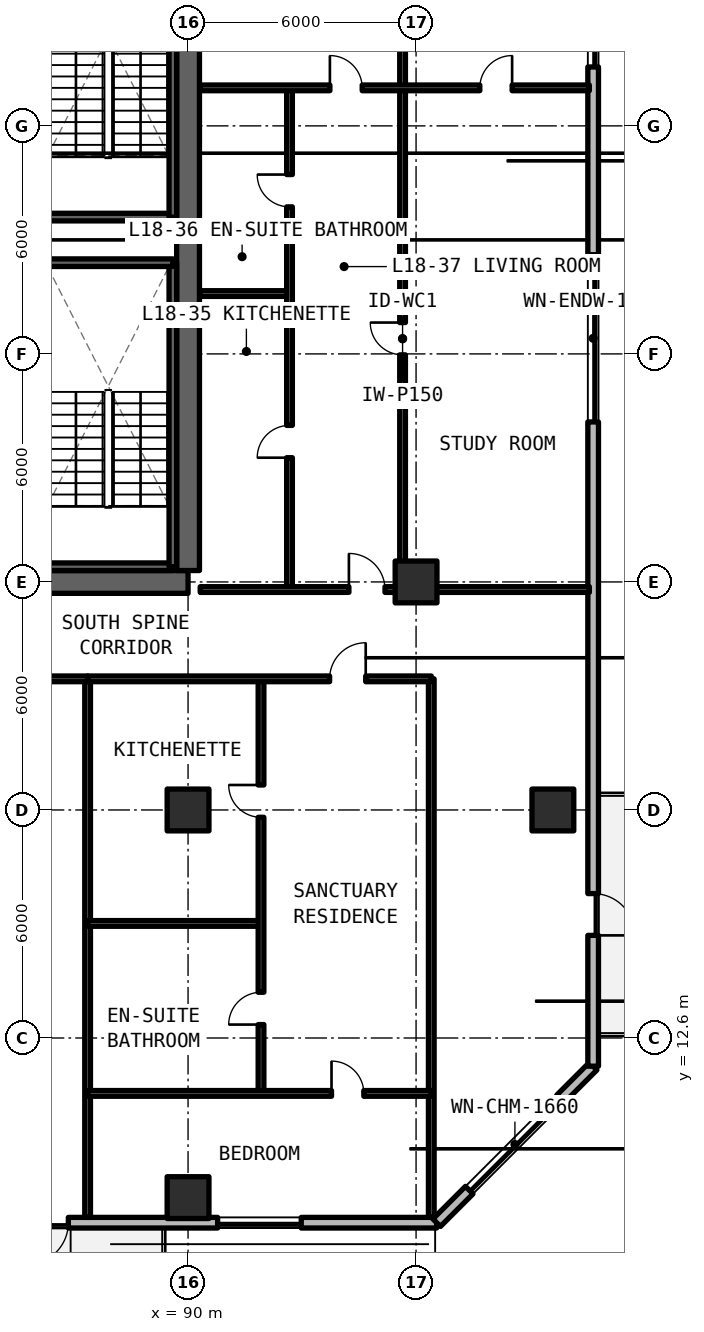
"""IFC4 building model, lengths in metres.
Left out: names, types, materials, properties, quantities, classifications, styles, units other than length and angle.
Written with IfcOpenShell. Run it as: python <this file> out.ifc"""

import sys

from ifc_helpers import new_model, si_unit, direction, frame, frame_2d, origin, origin_2d, place, context, subcontext, project, spatial, rectangle, extrude, element, fill, save


model = new_model("IFC4")
c1 = context("Model", 3, precision=1e-05, world=origin(), true_north=direction((0.0, 1.0)))
c2 = subcontext(c1, "Body", "Model", "MODEL_VIEW")
j1 = project(units=[si_unit("LENGTHUNIT", "METRE"), si_unit("PLANEANGLEUNIT", "RADIAN")], contexts=[c1])
p1 = place(None, origin())
s1 = spatial("IfcSite", under=j1, at=p1, CompositionType="ELEMENT")
p2 = place(p1, origin())
s2 = spatial("IfcBuilding", under=s1, at=p2, CompositionType="ELEMENT")
p3 = place(p2, frame((0.0, 0.0, 66.0)))
s3 = spatial("IfcBuildingStorey", under=s2, at=p3, CompositionType="ELEMENT", Elevation=66.0)
p4 = place(p3, frame((78.0, 24.6, 0.0), z_axis=(0.0, 0.0, 1.0), x_axis=(1.0, 0.0, 0.0)))
e1 = element("IfcWall", 1, at=p4, inside=s3, PredefinedType="SHEAR", context=c2, shape_type="SweptSolid", body=[
    extrude(rectangle(XDim=12.0, YDim=0.6, at=frame_2d((6.0, 0.0))), origin(), (0.0, 0.0, 1.0), 3.63),
])
p5 = place(p3, frame((90.0, 24.9, 0.0), z_axis=(0.0, 0.0, 1.0), x_axis=(0.0, 1.0, 0.0)))
e2 = element("IfcWall", 2, at=p5, inside=s3, PredefinedType="SHEAR", context=c2, shape_type="SweptSolid", body=[
    extrude(rectangle(XDim=17.4, YDim=0.6, at=frame_2d((8.7, 0.0))), origin(), (0.0, 0.0, 1.0), 3.63),
])
for number, where, z_axis, x_axis in (
    (3, (96.0, 24.6, 0.0), (0.0, 0.0, 1.0), (1.0, 0.0, 0.0)),
    (4, (90.0, 18.6, 0.0), (0.0, 0.0, 1.0), (1.0, 0.0, 0.0)),
    (5, (99.6, 18.6, 0.0), (0.0, 0.0, 1.0), (1.0, 0.0, 0.0)),
    (6, (90.0, 8.4, 0.0), (0.0, 0.0, 1.0), (1.0, 0.0, 0.0)),
):
    element("IfcColumn", number, at=place(p3, frame(where, z_axis=z_axis, x_axis=x_axis)), inside=s3, PredefinedType="COLUMN", context=c2, shape_type="SweptSolid", body=[
        extrude(rectangle(XDim=1.1, YDim=1.1, at=origin_2d()), origin(), (0.0, 0.0, 1.0), 3.63),
    ])
p6 = place(p3, frame((52.14, 7.74, 0.0), z_axis=(0.0, 0.0, 1.0), x_axis=(1.0, 0.0, 0.0)))
e7 = element("IfcWall", 7, at=p6, inside=s3, PredefinedType="SOLIDWALL", context=c2, shape_type="SweptSolid", body=[
    extrude(rectangle(XDim=44.402, YDim=0.28, at=frame_2d((22.201, 0.0))), origin(), (0.0, 0.0, 1.0), 3.41),
])
p7 = place(p6, frame((9.66, 0.0, 0.0)))
e8 = element("IfcOpeningElement", 8, at=p7, cuts=e7, PredefinedType="OPENING", context=c2, shape_type="SweptSolid", body=[
    extrude(rectangle(XDim=1.1, YDim=2.15, at=frame_2d((0.55, 1.075))), frame((0.0, 0.15, 0.0), z_axis=(0.0, -1.0, 0.0), x_axis=(1.0, 0.0, 0.0)), (0.0, 0.0, 1.0), 0.3),
])
p8 = place(p6, frame((21.76, 0.0, 0.0)))
e9 = element("IfcOpeningElement", 9, at=p8, cuts=e7, PredefinedType="OPENING", context=c2, shape_type="SweptSolid", body=[
    extrude(rectangle(XDim=1.1, YDim=2.15, at=frame_2d((0.55, 1.075))), frame((0.0, 0.15, 0.0), z_axis=(0.0, -1.0, 0.0), x_axis=(1.0, 0.0, 0.0)), (0.0, 0.0, 1.0), 0.3),
])
p9 = place(p6, frame((33.61, 0.0, 0.0)))
e10 = element("IfcOpeningElement", 10, at=p9, cuts=e7, PredefinedType="OPENING", context=c2, shape_type="SweptSolid", body=[
    extrude(rectangle(XDim=1.1, YDim=2.15, at=frame_2d((0.55, 1.075))), frame((0.0, 0.15, 0.0), z_axis=(0.0, -1.0, 0.0), x_axis=(1.0, 0.0, 0.0)), (0.0, 0.0, 1.0), 0.3),
])
p10 = place(p6, frame((2.622, 0.0, 0.78)))
e11 = element("IfcOpeningElement", 11, at=p10, cuts=e7, PredefinedType="OPENING", context=c2, shape_type="SweptSolid", body=[
    extrude(rectangle(XDim=2.2, YDim=1.66, at=frame_2d((1.1, 0.83))), frame((0.0, 0.15, 0.0), z_axis=(0.0, -1.0, 0.0), x_axis=(1.0, 0.0, 0.0)), (0.0, 0.0, 1.0), 0.3),
])
p11 = place(p6, frame((38.638, 0.0, 0.78)))
e12 = element("IfcOpeningElement", 12, at=p11, cuts=e7, PredefinedType="OPENING", context=c2, shape_type="SweptSolid", body=[
    extrude(rectangle(XDim=2.2, YDim=1.66, at=frame_2d((1.1, 0.83))), frame((0.0, 0.15, 0.0), z_axis=(0.0, -1.0, 0.0), x_axis=(1.0, 0.0, 0.0)), (0.0, 0.0, 1.0), 0.3),
])
p12 = place(p3, frame((96.542, 7.74, 0.0), z_axis=(0.0, 0.0, 1.0), x_axis=(0.707106781187, 0.707106781187, 0.0)))
e13 = element("IfcWall", 13, at=p12, inside=s3, PredefinedType="SOLIDWALL", context=c2, shape_type="SweptSolid", body=[
    extrude(rectangle(XDim=5.824, YDim=0.28, at=frame_2d((2.912, 0.0))), origin(), (0.0, 0.0, 1.0), 3.41),
])
p13 = place(p12, frame((1.212, 0.0, 0.78)))
e14 = element("IfcOpeningElement", 14, at=p13, cuts=e13, PredefinedType="OPENING", context=c2, shape_type="SweptSolid", body=[
    extrude(rectangle(XDim=3.4, YDim=1.66, at=frame_2d((1.7, 0.83))), frame((0.0, 0.15, 0.0), z_axis=(0.0, -1.0, 0.0), x_axis=(1.0, 0.0, 0.0)), (0.0, 0.0, 1.0), 0.3),
])
p14 = place(p3, frame((100.66, 11.858, 0.0), z_axis=(0.0, 0.0, 1.0), x_axis=(0.0, 1.0, 0.0)))
e15 = element("IfcWall", 15, at=p14, inside=s3, PredefinedType="SOLIDWALL", context=c2, shape_type="SweptSolid", body=[
    extrude(rectangle(XDim=43.484, YDim=0.28, at=frame_2d((21.742, 0.0))), origin(), (0.0, 0.0, 1.0), 3.41),
])
p15 = place(p14, frame((3.442, 0.0, 0.0)))
e16 = element("IfcOpeningElement", 16, at=p15, cuts=e15, PredefinedType="OPENING", context=c2, shape_type="SweptSolid", body=[
    extrude(rectangle(XDim=1.1, YDim=2.15, at=frame_2d((0.55, 1.075))), frame((0.0, 0.15, 0.0), z_axis=(0.0, -1.0, 0.0), x_axis=(1.0, 0.0, 0.0)), (0.0, 0.0, 1.0), 0.3),
])
p16 = place(p14, frame((16.952, 0.0, 0.78)))
e17 = element("IfcOpeningElement", 17, at=p16, cuts=e15, PredefinedType="OPENING", context=c2, shape_type="SweptSolid", body=[
    extrude(rectangle(XDim=4.4, YDim=1.66, at=frame_2d((2.2, 0.83))), frame((0.0, 0.15, 0.0), z_axis=(0.0, -1.0, 0.0), x_axis=(1.0, 0.0, 0.0)), (0.0, 0.0, 1.0), 0.3),
])
p17 = place(p14, frame((26.292, 0.0, 0.78)))
e18 = element("IfcOpeningElement", 18, at=p17, cuts=e15, PredefinedType="OPENING", context=c2, shape_type="SweptSolid", body=[
    extrude(rectangle(XDim=4.4, YDim=1.66, at=frame_2d((2.2, 0.83))), frame((0.0, 0.15, 0.0), z_axis=(0.0, -1.0, 0.0), x_axis=(1.0, 0.0, 0.0)), (0.0, 0.0, 1.0), 0.3),
])
p18 = place(p3, frame((95.645, 24.4, 0.0), z_axis=(0.0, 0.0, 1.0), x_axis=(0.0, 1.0, 0.0)))
e19 = element("IfcWall", 19, at=p18, inside=s3, PredefinedType="PARTITIONING", context=c2, shape_type="SweptSolid", body=[
    extrude(rectangle(XDim=13.2, YDim=0.15, at=frame_2d((6.6, 0.0))), origin(), (0.0, 0.0, 1.0), 2.63),
])
p19 = place(p18, frame((6.175, 0.0, 0.0)))
e20 = element("IfcOpeningElement", 20, at=p19, cuts=e19, PredefinedType="OPENING", context=c2, shape_type="SweptSolid", body=[
    extrude(rectangle(XDim=0.85, YDim=2.1, at=frame_2d((0.425, 1.05))), frame((0.0, 0.085, 0.0), z_axis=(0.0, -1.0, 0.0), x_axis=(1.0, 0.0, 0.0)), (0.0, 0.0, 1.0), 0.17),
])
p20 = place(p3, frame((90.32, 32.188, 0.0), z_axis=(0.0, 0.0, 1.0), x_axis=(1.0, 0.0, 0.0)))
e21 = element("IfcWall", 21, at=p20, inside=s3, PredefinedType="PARTITIONING", context=c2, shape_type="SweptSolid", body=[
    extrude(rectangle(XDim=2.35, YDim=0.15, at=frame_2d((1.175, 0.0))), origin(), (0.0, 0.0, 1.0), 2.63),
])
p21 = place(p3, frame((92.67, 24.4, 0.0), z_axis=(0.0, 0.0, 1.0), x_axis=(0.0, 1.0, 0.0)))
e22 = element("IfcWall", 22, at=p21, inside=s3, PredefinedType="PARTITIONING", context=c2, shape_type="SweptSolid", body=[
    extrude(rectangle(XDim=13.2, YDim=0.15, at=frame_2d((6.6, 0.0))), origin(), (0.0, 0.0, 1.0), 2.63),
])
p22 = place(p21, frame((3.469, 0.0, 0.0)))
e23 = element("IfcOpeningElement", 23, at=p22, cuts=e22, PredefinedType="OPENING", context=c2, shape_type="SweptSolid", body=[
    extrude(rectangle(XDim=0.85, YDim=2.1, at=frame_2d((0.425, 1.05))), frame((0.0, 0.085, 0.0), z_axis=(0.0, -1.0, 0.0), x_axis=(1.0, 0.0, 0.0)), (0.0, 0.0, 1.0), 0.17),
])
p23 = place(p21, frame((10.069, 0.0, 0.0)))
e24 = element("IfcOpeningElement", 24, at=p23, cuts=e22, PredefinedType="OPENING", context=c2, shape_type="SweptSolid", body=[
    extrude(rectangle(XDim=0.85, YDim=2.1, at=frame_2d((0.425, 1.05))), frame((0.0, 0.085, 0.0), z_axis=(0.0, -1.0, 0.0), x_axis=(1.0, 0.0, 0.0)), (0.0, 0.0, 1.0), 0.17),
])
p24 = place(p3, frame((95.645, 37.6, 0.0), z_axis=(0.0, 0.0, 1.0), x_axis=(0.0, 1.0, 0.0)))
e25 = element("IfcWall", 25, at=p24, inside=s3, PredefinedType="PARTITIONING", context=c2, shape_type="SweptSolid", body=[
    extrude(rectangle(XDim=5.2, YDim=0.15, at=frame_2d((2.6, 0.0))), origin(), (0.0, 0.0, 1.0), 2.63),
])
p25 = place(p3, frame((90.32, 37.6, 0.0), z_axis=(0.0, 0.0, 1.0), x_axis=(1.0, 0.0, 0.0)))
e26 = element("IfcWall", 26, at=p25, inside=s3, PredefinedType="PARTITIONING", context=c2, shape_type="SweptSolid", body=[
    extrude(rectangle(XDim=10.24, YDim=0.15, at=frame_2d((5.12, 0.0))), origin(), (0.0, 0.0, 1.0), 2.63),
])
p26 = place(p25, frame((3.412, 0.0, 0.0)))
e27 = element("IfcOpeningElement", 27, at=p26, cuts=e26, PredefinedType="OPENING", context=c2, shape_type="SweptSolid", body=[
    extrude(rectangle(XDim=0.85, YDim=2.1, at=frame_2d((0.425, 1.05))), frame((0.0, 0.085, 0.0), z_axis=(0.0, -1.0, 0.0), x_axis=(1.0, 0.0, 0.0)), (0.0, 0.0, 1.0), 0.17),
])
p27 = place(p25, frame((7.357, 0.0, 0.0)))
e28 = element("IfcOpeningElement", 28, at=p27, cuts=e26, PredefinedType="OPENING", context=c2, shape_type="SweptSolid", body=[
    extrude(rectangle(XDim=0.85, YDim=2.1, at=frame_2d((0.425, 1.05))), frame((0.0, 0.085, 0.0), z_axis=(0.0, -1.0, 0.0), x_axis=(1.0, 0.0, 0.0)), (0.0, 0.0, 1.0), 0.17),
])
p28 = place(p3, frame((90.32, 24.4, 0.0), z_axis=(0.0, 0.0, 1.0), x_axis=(1.0, 0.0, 0.0)))
e29 = element("IfcWall", 29, at=p28, inside=s3, PredefinedType="SOLIDWALL", context=c2, shape_type="SweptSolid", body=[
    extrude(rectangle(XDim=10.24, YDim=0.15, at=frame_2d((5.12, 0.0))), origin(), (0.0, 0.0, 1.0), 2.625),
])
p29 = place(p28, frame((3.913, 0.0, 0.0)))
e30 = element("IfcOpeningElement", 30, at=p29, cuts=e29, PredefinedType="OPENING", context=c2, shape_type="SweptSolid", body=[
    extrude(rectangle(XDim=0.95, YDim=2.15, at=frame_2d((0.475, 1.075))), frame((0.0, 0.085, 0.0), z_axis=(0.0, -1.0, 0.0), x_axis=(1.0, 0.0, 0.0)), (0.0, 0.0, 1.0), 0.17),
])
for number, where, z_axis, x_axis in (
    (31, (96.4, 7.88, 0.0), (0.0, 0.0, 1.0), (0.0, 1.0, 0.0)),
    (32, (87.357, 7.88, 0.0), (0.0, 0.0, 1.0), (0.0, 1.0, 0.0)),
):
    element("IfcWall", number, at=place(p3, frame(where, z_axis=z_axis, x_axis=x_axis)), inside=s3, PredefinedType="SOLIDWALL", context=c2, shape_type="SweptSolid", body=[
        extrude(rectangle(XDim=14.17, YDim=0.15, at=frame_2d((7.085, 0.0))), origin(), (0.0, 0.0, 1.0), 2.63),
    ])
p30 = place(p3, frame((77.69, 22.05, 0.0), z_axis=(0.0, 0.0, 1.0), x_axis=(1.0, 0.0, 0.0)))
e33 = element("IfcWall", 33, at=p30, inside=s3, PredefinedType="SOLIDWALL", context=c2, shape_type="SweptSolid", body=[
    extrude(rectangle(XDim=9.667, YDim=0.15, at=frame_2d((4.833, 0.0))), origin(), (0.0, 0.0, 1.0), 2.63),
])
p31 = place(p30, frame((4.283, 0.0, 0.0)))
e34 = element("IfcOpeningElement", 34, at=p31, cuts=e33, PredefinedType="OPENING", context=c2, shape_type="SweptSolid", body=[
    extrude(rectangle(XDim=1.1, YDim=2.15, at=frame_2d((0.55, 1.075))), frame((0.0, 0.085, 0.0), z_axis=(0.0, -1.0, 0.0), x_axis=(1.0, 0.0, 0.0)), (0.0, 0.0, 1.0), 0.17),
])
p32 = place(p3, frame((87.357, 15.615, 0.0), z_axis=(0.0, 0.0, 1.0), x_axis=(1.0, 0.0, 0.0)))
e35 = element("IfcWall", 35, at=p32, inside=s3, PredefinedType="PARTITIONING", context=c2, shape_type="SweptSolid", body=[
    extrude(rectangle(XDim=4.563, YDim=0.15, at=frame_2d((2.281, 0.0))), origin(), (0.0, 0.0, 1.0), 2.63),
])
p33 = place(p3, frame((91.92, 11.142, 0.0), z_axis=(0.0, 0.0, 1.0), x_axis=(0.0, 1.0, 0.0)))
e36 = element("IfcWall", 36, at=p33, inside=s3, PredefinedType="PARTITIONING", context=c2, shape_type="SweptSolid", body=[
    extrude(rectangle(XDim=10.908, YDim=0.15, at=frame_2d((5.454, 0.0))), origin(), (0.0, 0.0, 1.0), 2.63),
])
p34 = place(p33, frame((1.811, 0.0, 0.0)))
e37 = element("IfcOpeningElement", 37, at=p34, cuts=e36, PredefinedType="OPENING", context=c2, shape_type="SweptSolid", body=[
    extrude(rectangle(XDim=0.85, YDim=2.1, at=frame_2d((0.425, 1.05))), frame((0.0, 0.085, 0.0), z_axis=(0.0, -1.0, 0.0), x_axis=(1.0, 0.0, 0.0)), (0.0, 0.0, 1.0), 0.17),
])
p35 = place(p33, frame((7.265, 0.0, 0.0)))
e38 = element("IfcOpeningElement", 38, at=p35, cuts=e36, PredefinedType="OPENING", context=c2, shape_type="SweptSolid", body=[
    extrude(rectangle(XDim=0.85, YDim=2.1, at=frame_2d((0.425, 1.05))), frame((0.0, 0.085, 0.0), z_axis=(0.0, -1.0, 0.0), x_axis=(1.0, 0.0, 0.0)), (0.0, 0.0, 1.0), 0.17),
])
p36 = place(p3, frame((87.357, 11.142, 0.0), z_axis=(0.0, 0.0, 1.0), x_axis=(1.0, 0.0, 0.0)))
e39 = element("IfcWall", 39, at=p36, inside=s3, PredefinedType="PARTITIONING", context=c2, shape_type="SweptSolid", body=[
    extrude(rectangle(XDim=9.043, YDim=0.15, at=frame_2d((4.521, 0.0))), origin(), (0.0, 0.0, 1.0), 2.63),
])
p37 = place(p36, frame((6.418, 0.0, 0.0)))
e40 = element("IfcOpeningElement", 40, at=p37, cuts=e39, PredefinedType="OPENING", context=c2, shape_type="SweptSolid", body=[
    extrude(rectangle(XDim=0.85, YDim=2.1, at=frame_2d((0.425, 1.05))), frame((0.0, 0.085, 0.0), z_axis=(0.0, -1.0, 0.0), x_axis=(1.0, 0.0, 0.0)), (0.0, 0.0, 1.0), 0.17),
])
p38 = place(p3, frame((87.357, 22.05, 0.0), z_axis=(0.0, 0.0, 1.0), x_axis=(1.0, 0.0, 0.0)))
e41 = element("IfcWall", 41, at=p38, inside=s3, PredefinedType="SOLIDWALL", context=c2, shape_type="SweptSolid", body=[
    extrude(rectangle(XDim=9.043, YDim=0.15, at=frame_2d((4.521, 0.0))), origin(), (0.0, 0.0, 1.0), 2.63),
])
p39 = place(p38, frame((6.368, 0.0, 0.0)))
e42 = element("IfcOpeningElement", 42, at=p39, cuts=e41, PredefinedType="OPENING", context=c2, shape_type="SweptSolid", body=[
    extrude(rectangle(XDim=0.95, YDim=2.15, at=frame_2d((0.475, 1.075))), frame((0.0, 0.085, 0.0), z_axis=(0.0, -1.0, 0.0), x_axis=(1.0, 0.0, 0.0)), (0.0, 0.0, 1.0), 0.17),
])
p40 = place(p3, frame((86.2, 25.0, 0.0), z_axis=(0.0, 0.0, 1.0), x_axis=(1.0, 0.0, 0.0)))
e43 = element("IfcWall", 43, at=p40, inside=s3, PredefinedType="SOLIDWALL", context=c2, shape_type="SweptSolid", body=[
    extrude(rectangle(XDim=3.4, YDim=0.2, at=frame_2d((1.7, 0.0))), origin(), (0.0, 0.0, 1.0), 3.63),
])
p41 = place(p3, frame((89.6, 25.0, 0.0), z_axis=(0.0, 0.0, 1.0), x_axis=(0.0, 1.0, 0.0)))
e44 = element("IfcWall", 44, at=p41, inside=s3, PredefinedType="SOLIDWALL", context=c2, shape_type="SweptSolid", body=[
    extrude(rectangle(XDim=8.0, YDim=0.2, at=frame_2d((4.0, 0.0))), origin(), (0.0, 0.0, 1.0), 3.63),
])
for number, where, z_axis, x_axis in (
    (45, (89.6, 33.0, 0.0), (0.0, 0.0, 1.0), (-1.0, 0.0, 0.0)),
    (46, (86.2, 34.2, 0.0), (0.0, 0.0, 1.0), (1.0, 0.0, 0.0)),
):
    element("IfcWall", number, at=place(p3, frame(where, z_axis=z_axis, x_axis=x_axis)), inside=s3, PredefinedType="SOLIDWALL", context=c2, shape_type="SweptSolid", body=[
        extrude(rectangle(XDim=3.4, YDim=0.2, at=frame_2d((1.7, 0.0))), origin(), (0.0, 0.0, 1.0), 3.63),
    ])
p42 = place(p3, frame((89.6, 34.2, 0.0), z_axis=(0.0, 0.0, 1.0), x_axis=(0.0, 1.0, 0.0)))
e47 = element("IfcWall", 47, at=p42, inside=s3, PredefinedType="SOLIDWALL", context=c2, shape_type="SweptSolid", body=[
    extrude(rectangle(XDim=8.0, YDim=0.2, at=frame_2d((4.0, 0.0))), origin(), (0.0, 0.0, 1.0), 3.63),
])
p43 = place(p9, frame((1.1, 0.0, 0.0), z_axis=(0.0, 0.0, 1.0), x_axis=(-1.0, 0.0, 0.0)))
e48 = element("IfcDoor", 48, at=p43, inside=s3, OperationType="SINGLE_SWING_LEFT", PredefinedType="DOOR", context=c2, shape_type="SweptSolid", body=[
    extrude(rectangle(XDim=1.1, YDim=2.15, at=frame_2d((0.55, 1.075))), frame((0.0, 0.025, 0.0), z_axis=(0.0, -1.0, 0.0), x_axis=(1.0, 0.0, 0.0)), (0.0, 0.0, 1.0), 0.05),
])
fill(e10, e48)
p44 = place(p11, origin())
e49 = element("IfcWindow", 49, at=p44, inside=s3, PartitioningType="SINGLE_PANEL", PredefinedType="WINDOW", context=c2, shape_type="SweptSolid", body=[
    extrude(rectangle(XDim=2.2, YDim=1.66, at=frame_2d((1.1, 0.83))), frame((0.0, 0.03, 0.0), z_axis=(0.0, -1.0, 0.0), x_axis=(1.0, 0.0, 0.0)), (0.0, 0.0, 1.0), 0.06),
])
fill(e12, e49)
p45 = place(p13, origin())
e50 = element("IfcWindow", 50, at=p45, inside=s3, PartitioningType="SINGLE_PANEL", PredefinedType="WINDOW", context=c2, shape_type="SweptSolid", body=[
    extrude(rectangle(XDim=3.4, YDim=1.66, at=frame_2d((1.7, 0.83))), frame((0.0, 0.03, 0.0), z_axis=(0.0, -1.0, 0.0), x_axis=(1.0, 0.0, 0.0)), (0.0, 0.0, 1.0), 0.06),
])
fill(e14, e50)
p46 = place(p15, frame((1.1, 0.0, 0.0), z_axis=(0.0, 0.0, 1.0), x_axis=(-1.0, 0.0, 0.0)))
e51 = element("IfcDoor", 51, at=p46, inside=s3, OperationType="SINGLE_SWING_RIGHT", PredefinedType="DOOR", context=c2, shape_type="SweptSolid", body=[
    extrude(rectangle(XDim=1.1, YDim=2.15, at=frame_2d((0.55, 1.075))), frame((0.0, 0.025, 0.0), z_axis=(0.0, -1.0, 0.0), x_axis=(1.0, 0.0, 0.0)), (0.0, 0.0, 1.0), 0.05),
])
fill(e16, e51)
p47 = place(p16, origin())
e52 = element("IfcWindow", 52, at=p47, inside=s3, PartitioningType="SINGLE_PANEL", PredefinedType="WINDOW", context=c2, shape_type="SweptSolid", body=[
    extrude(rectangle(XDim=4.4, YDim=1.66, at=frame_2d((2.2, 0.83))), frame((0.0, 0.03, 0.0), z_axis=(0.0, -1.0, 0.0), x_axis=(1.0, 0.0, 0.0)), (0.0, 0.0, 1.0), 0.06),
])
fill(e17, e52)
p48 = place(p17, origin())
e53 = element("IfcWindow", 53, at=p48, inside=s3, PartitioningType="SINGLE_PANEL", PredefinedType="WINDOW", context=c2, shape_type="SweptSolid", body=[
    extrude(rectangle(XDim=4.4, YDim=1.66, at=frame_2d((2.2, 0.83))), frame((0.0, 0.03, 0.0), z_axis=(0.0, -1.0, 0.0), x_axis=(1.0, 0.0, 0.0)), (0.0, 0.0, 1.0), 0.06),
])
fill(e18, e53)
p49 = place(p19, origin())
e54 = element("IfcDoor", 54, at=p49, inside=s3, OperationType="SINGLE_SWING_RIGHT", PredefinedType="DOOR", context=c2, shape_type="SweptSolid", body=[
    extrude(rectangle(XDim=0.85, YDim=2.1, at=frame_2d((0.425, 1.05))), frame((0.0, 0.025, 0.0), z_axis=(0.0, -1.0, 0.0), x_axis=(1.0, 0.0, 0.0)), (0.0, 0.0, 1.0), 0.05),
])
fill(e20, e54)
p50 = place(p22, origin())
e55 = element("IfcDoor", 55, at=p50, inside=s3, OperationType="SINGLE_SWING_LEFT", PredefinedType="DOOR", context=c2, shape_type="SweptSolid", body=[
    extrude(rectangle(XDim=0.85, YDim=2.1, at=frame_2d((0.425, 1.05))), frame((0.0, 0.025, 0.0), z_axis=(0.0, -1.0, 0.0), x_axis=(1.0, 0.0, 0.0)), (0.0, 0.0, 1.0), 0.05),
])
fill(e23, e55)
p51 = place(p23, origin())
e56 = element("IfcDoor", 56, at=p51, inside=s3, OperationType="SINGLE_SWING_RIGHT", PredefinedType="DOOR", context=c2, shape_type="SweptSolid", body=[
    extrude(rectangle(XDim=0.85, YDim=2.1, at=frame_2d((0.425, 1.05))), frame((0.0, 0.025, 0.0), z_axis=(0.0, -1.0, 0.0), x_axis=(1.0, 0.0, 0.0)), (0.0, 0.0, 1.0), 0.05),
])
fill(e24, e56)
p52 = place(p26, origin())
e57 = element("IfcDoor", 57, at=p52, inside=s3, OperationType="SINGLE_SWING_LEFT", PredefinedType="DOOR", context=c2, shape_type="SweptSolid", body=[
    extrude(rectangle(XDim=0.85, YDim=2.1, at=frame_2d((0.425, 1.05))), frame((0.0, 0.025, 0.0), z_axis=(0.0, -1.0, 0.0), x_axis=(1.0, 0.0, 0.0)), (0.0, 0.0, 1.0), 0.05),
])
fill(e27, e57)
p53 = place(p27, origin())
e58 = element("IfcDoor", 58, at=p53, inside=s3, OperationType="SINGLE_SWING_RIGHT", PredefinedType="DOOR", context=c2, shape_type="SweptSolid", body=[
    extrude(rectangle(XDim=0.85, YDim=2.1, at=frame_2d((0.425, 1.05))), frame((0.0, 0.025, 0.0), z_axis=(0.0, -1.0, 0.0), x_axis=(1.0, 0.0, 0.0)), (0.0, 0.0, 1.0), 0.05),
])
fill(e28, e58)
p54 = place(p29, origin())
e59 = element("IfcDoor", 59, at=p54, inside=s3, OperationType="SINGLE_SWING_LEFT", PredefinedType="DOOR", context=c2, shape_type="SweptSolid", body=[
    extrude(rectangle(XDim=0.95, YDim=2.15, at=frame_2d((0.475, 1.075))), frame((0.0, 0.025, 0.0), z_axis=(0.0, -1.0, 0.0), x_axis=(1.0, 0.0, 0.0)), (0.0, 0.0, 1.0), 0.05),
])
fill(e30, e59)
p55 = place(p34, origin())
e60 = element("IfcDoor", 60, at=p55, inside=s3, OperationType="SINGLE_SWING_LEFT", PredefinedType="DOOR", context=c2, shape_type="SweptSolid", body=[
    extrude(rectangle(XDim=0.85, YDim=2.1, at=frame_2d((0.425, 1.05))), frame((0.0, 0.025, 0.0), z_axis=(0.0, -1.0, 0.0), x_axis=(1.0, 0.0, 0.0)), (0.0, 0.0, 1.0), 0.05),
])
fill(e37, e60)
p56 = place(p35, origin())
e61 = element("IfcDoor", 61, at=p56, inside=s3, OperationType="SINGLE_SWING_RIGHT", PredefinedType="DOOR", context=c2, shape_type="SweptSolid", body=[
    extrude(rectangle(XDim=0.85, YDim=2.1, at=frame_2d((0.425, 1.05))), frame((0.0, 0.025, 0.0), z_axis=(0.0, -1.0, 0.0), x_axis=(1.0, 0.0, 0.0)), (0.0, 0.0, 1.0), 0.05),
])
fill(e38, e61)
p57 = place(p37, origin())
e62 = element("IfcDoor", 62, at=p57, inside=s3, OperationType="SINGLE_SWING_LEFT", PredefinedType="DOOR", context=c2, shape_type="SweptSolid", body=[
    extrude(rectangle(XDim=0.85, YDim=2.1, at=frame_2d((0.425, 1.05))), frame((0.0, 0.025, 0.0), z_axis=(0.0, -1.0, 0.0), x_axis=(1.0, 0.0, 0.0)), (0.0, 0.0, 1.0), 0.05),
])
fill(e40, e62)
p58 = place(p39, origin())
e63 = element("IfcDoor", 63, at=p58, inside=s3, OperationType="SINGLE_SWING_RIGHT", PredefinedType="DOOR", context=c2, shape_type="SweptSolid", body=[
    extrude(rectangle(XDim=0.95, YDim=2.15, at=frame_2d((0.475, 1.075))), frame((0.0, 0.025, 0.0), z_axis=(0.0, -1.0, 0.0), x_axis=(1.0, 0.0, 0.0)), (0.0, 0.0, 1.0), 0.05),
])
fill(e42, e63)
save(model, sys.argv[1])
